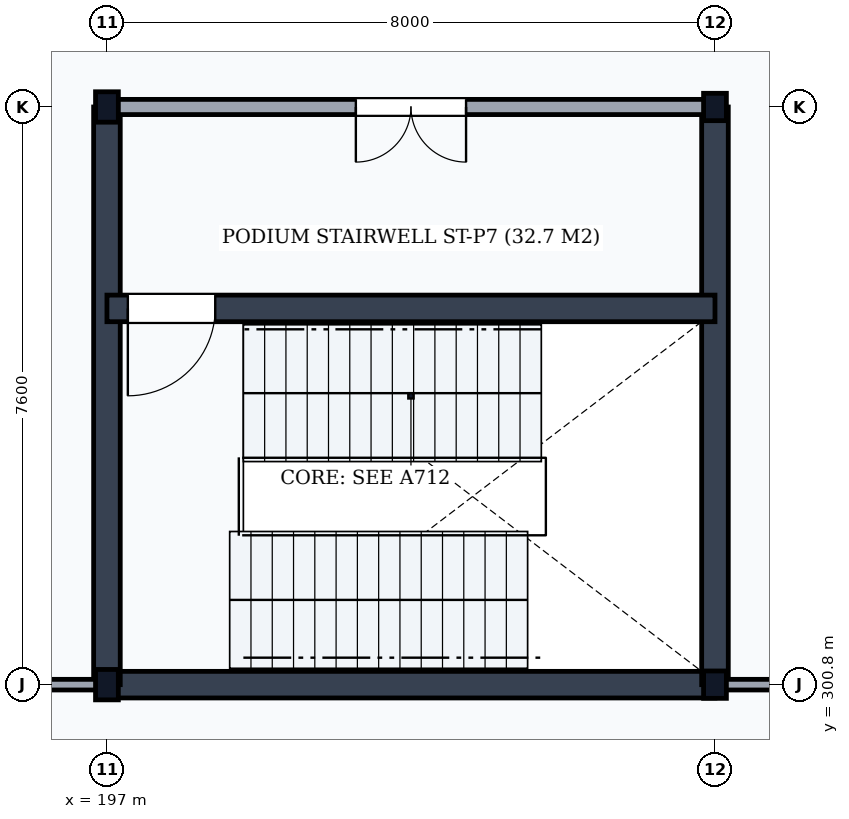
"""IFC4 building model, lengths in metres.
Left out: names, types, materials, properties, quantities, classifications, styles, units other than length and angle.
Written with IfcOpenShell. Run it as: python <this file> out.ifc"""

import sys

from ifc_helpers import new_model, si_unit, direction, frame, frame_2d, origin, origin_2d, place, context, subcontext, project, spatial, rectangle, i_section, extrude, element, fill, save


model = new_model("IFC4")
c1 = context("Model", 3, precision=1e-05, world=origin(), true_north=direction((0.0, 1.0)))
c2 = subcontext(c1, "Body", "Model", "MODEL_VIEW")
j1 = project(units=[si_unit("LENGTHUNIT", "METRE"), si_unit("PLANEANGLEUNIT", "RADIAN")], contexts=[c1])
p1 = place(None, origin())
s1 = spatial("IfcSite", under=j1, at=p1, CompositionType="ELEMENT")
p2 = place(p1, origin())
s2 = spatial("IfcBuilding", under=s1, at=p2, CompositionType="ELEMENT")
p3 = place(p2, frame((0.0, 0.0, 10.5)))
s3 = spatial("IfcBuildingStorey", under=s2, at=p3, CompositionType="ELEMENT", Elevation=10.5)
for number, where, z_axis, x_axis in (
    (1, (197.0, 300.8, 0.0), (0.0, 0.0, 1.0), (1.0, 0.0, 0.0)),
    (2, (197.0, 308.4, 0.0), (0.0, 0.0, 1.0), (1.0, 0.0, 0.0)),
):
    element("IfcColumn", number, at=place(p3, frame(where, z_axis=z_axis, x_axis=x_axis)), inside=s3, PredefinedType="COLUMN", context=c2, shape_type="SweptSolid", body=[
        extrude(i_section(OverallWidth=0.3, OverallDepth=0.4, WebThickness=0.013, FlangeThickness=0.024, FilletRadius=0.027, at=origin_2d()), origin(), (0.0, 0.0, 1.0), 5.1),
    ])
for number, where, z_axis, x_axis in (
    (3, (205.0, 300.8, 0.0), (0.0, 0.0, 1.0), (1.0, 0.0, 0.0)),
    (4, (205.0, 308.4, 0.0), (0.0, 0.0, 1.0), (1.0, 0.0, 0.0)),
):
    element("IfcColumn", number, at=place(p3, frame(where, z_axis=z_axis, x_axis=x_axis)), inside=s3, PredefinedType="COLUMN", context=c2, shape_type="SweptSolid", body=[
        extrude(i_section(OverallWidth=0.3, OverallDepth=0.36, WebThickness=0.012, FlangeThickness=0.022, FilletRadius=0.027, at=origin_2d()), origin(), (0.0, 0.0, 1.0), 5.1),
    ])
p4 = place(p3, frame((197.0, 300.8, 0.0), z_axis=(0.0, 0.0, 1.0), x_axis=(1.0, 0.0, 0.0)))
e5 = element("IfcWall", 5, at=p4, inside=s3, PredefinedType="SHEAR", context=c2, shape_type="SweptSolid", body=[
    extrude(rectangle(XDim=8.0, YDim=0.35, at=frame_2d((4.0, 0.0))), origin(), (0.0, 0.0, 1.0), 4.84),
])
for number, where, z_axis, x_axis in (
    (6, (197.0, 300.8, 0.0), (0.0, 0.0, 1.0), (0.0, 1.0, 0.0)),
    (7, (205.0, 300.8, 0.0), (0.0, 0.0, 1.0), (0.0, 1.0, 0.0)),
):
    element("IfcWall", number, at=place(p3, frame(where, z_axis=z_axis, x_axis=x_axis)), inside=s3, PredefinedType="SHEAR", context=c2, shape_type="SweptSolid", body=[
        extrude(rectangle(XDim=7.6, YDim=0.35, at=frame_2d((3.8, 0.0))), origin(), (0.0, 0.0, 1.0), 4.84),
    ])
p5 = place(p3, frame((197.0, 305.75, 0.0), z_axis=(0.0, 0.0, 1.0), x_axis=(1.0, 0.0, 0.0)))
e8 = element("IfcWall", 8, at=p5, inside=s3, PredefinedType="SHEAR", context=c2, shape_type="SweptSolid", body=[
    extrude(rectangle(XDim=8.0, YDim=0.35, at=frame_2d((4.0, 0.0))), origin(), (0.0, 0.0, 1.0), 4.84),
])
p6 = place(p5, frame((0.275, 0.0, 0.0)))
e9 = element("IfcOpeningElement", 9, at=p6, cuts=e8, PredefinedType="OPENING", context=c2, shape_type="SweptSolid", body=[
    extrude(rectangle(XDim=1.15, YDim=2.15, at=frame_2d((0.575, 1.075))), frame((0.0, 0.19, 0.0), z_axis=(0.0, -1.0, 0.0), x_axis=(1.0, 0.0, 0.0)), (0.0, 0.0, 1.0), 0.38),
])
p7 = place(p3, frame((197.0, 308.4, 0.0), z_axis=(0.0, 0.0, 1.0), x_axis=(1.0, 0.0, 0.0)))
e10 = element("IfcWall", 10, at=p7, inside=s3, PredefinedType="PARTITIONING", context=c2, shape_type="SweptSolid", body=[
    extrude(rectangle(XDim=8.0, YDim=0.2, at=frame_2d((4.0, 0.0))), origin(), (0.0, 0.0, 1.0), 4.388),
])
p8 = place(p7, frame((3.275, 0.0, 0.0)))
e11 = element("IfcOpeningElement", 11, at=p8, cuts=e10, PredefinedType="OPENING", context=c2, shape_type="SweptSolid", body=[
    extrude(rectangle(XDim=1.45, YDim=2.2, at=frame_2d((0.725, 1.1))), frame((0.0, 0.115, 0.0), z_axis=(0.0, -1.0, 0.0), x_axis=(1.0, 0.0, 0.0)), (0.0, 0.0, 1.0), 0.23),
])
p9 = place(p3, frame((165.0, 300.8, 0.0), z_axis=(0.0, 0.0, 1.0), x_axis=(1.0, 0.0, 0.0)))
e12 = element("IfcWall", 12, at=p9, inside=s3, PredefinedType="PARTITIONING", context=c2, shape_type="SweptSolid", body=[
    extrude(rectangle(XDim=32.0, YDim=0.14, at=frame_2d((16.0, 0.0))), origin(), (0.0, 0.0, 1.0), 4.388),
])
p10 = place(p3, frame((205.0, 300.8, 0.0), z_axis=(0.0, 0.0, 1.0), x_axis=(1.0, 0.0, 0.0)))
e13 = element("IfcWall", 13, at=p10, inside=s3, PredefinedType="PARTITIONING", context=c2, shape_type="SweptSolid", body=[
    extrude(rectangle(XDim=41.0, YDim=0.14, at=frame_2d((20.5, 0.0))), origin(), (0.0, 0.0, 1.0), 4.288),
])
p11 = place(p6, frame((1.15, 0.0, 0.0), z_axis=(0.0, 0.0, 1.0), x_axis=(-1.0, 0.0, 0.0)))
e14 = element("IfcDoor", 14, at=p11, inside=s3, OperationType="SINGLE_SWING_RIGHT", PredefinedType="DOOR", context=c2, shape_type="SweptSolid", body=[
    extrude(rectangle(XDim=1.15, YDim=2.15, at=frame_2d((0.575, 1.075))), frame((0.0, 0.025, 0.0), z_axis=(0.0, -1.0, 0.0), x_axis=(1.0, 0.0, 0.0)), (0.0, 0.0, 1.0), 0.05),
])
fill(e9, e14)
p12 = place(p8, frame((1.45, 0.0, 0.0), z_axis=(0.0, 0.0, 1.0), x_axis=(-1.0, 0.0, 0.0)))
e15 = element("IfcDoor", 15, at=p12, inside=s3, OperationType="DOUBLE_DOOR_SINGLE_SWING", PredefinedType="DOOR", context=c2, shape_type="SweptSolid", body=[
    extrude(rectangle(XDim=1.45, YDim=2.2, at=frame_2d((0.725, 1.1))), frame((0.0, 0.025, 0.0), z_axis=(0.0, -1.0, 0.0), x_axis=(1.0, 0.0, 0.0)), (0.0, 0.0, 1.0), 0.05),
])
fill(e11, e15)
save(model, sys.argv[1])
